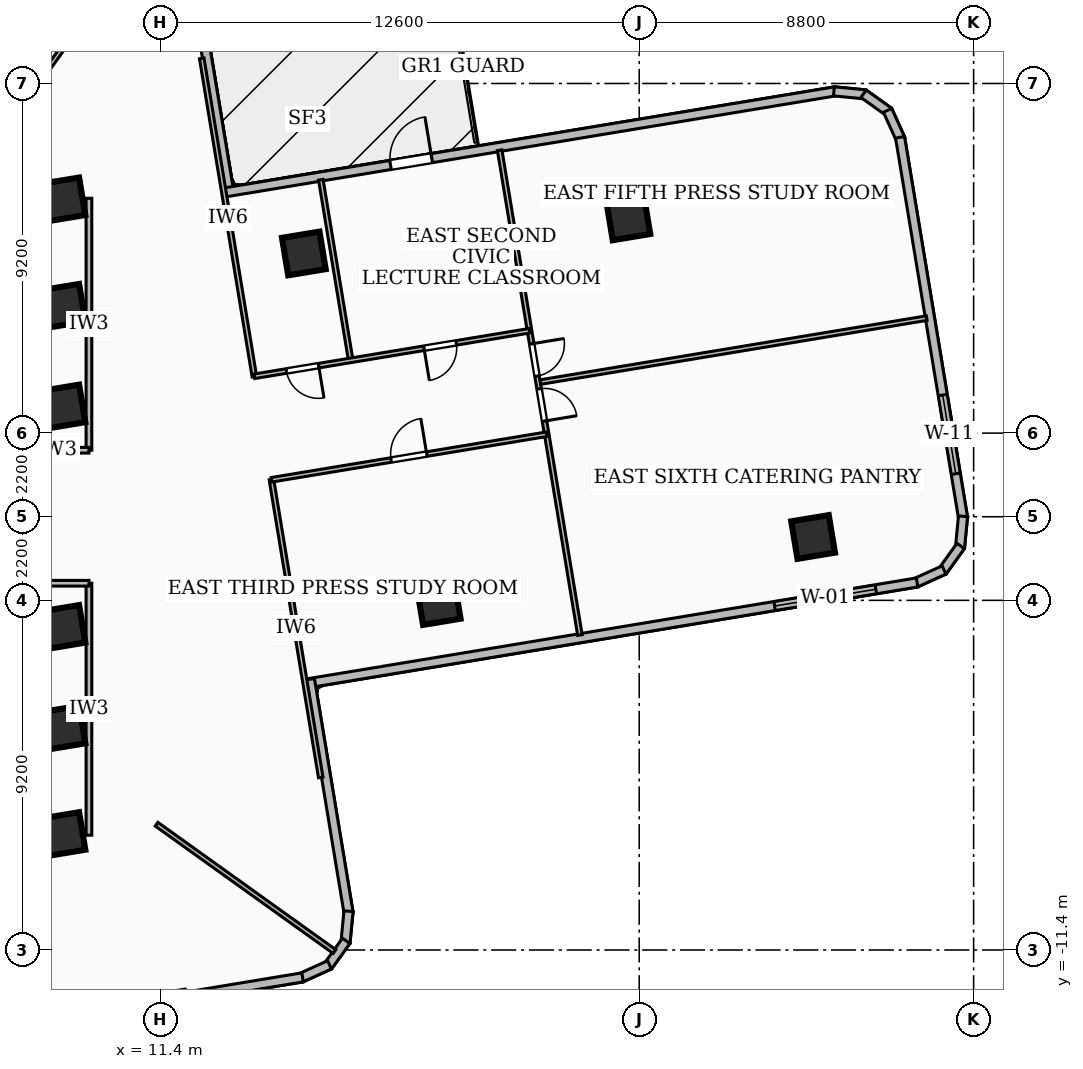
"""IFC4 building model, lengths in metres.
Left out: names, types, materials, properties, quantities, classifications, styles, units other than length and angle.
Written with IfcOpenShell. Run it as: python <this file> out.ifc"""

import sys

from ifc_helpers import new_model, si_unit, direction, frame, frame_2d, origin, origin_2d, place, context, subcontext, project, spatial, rectangle, extrude, element, fill, save


model = new_model("IFC4")
c1 = context("Model", 3, precision=1e-05, world=origin(), true_north=direction((0.0, 1.0)))
c2 = subcontext(c1, "Body", "Model", "MODEL_VIEW")
j1 = project(units=[si_unit("LENGTHUNIT", "METRE"), si_unit("PLANEANGLEUNIT", "RADIAN")], contexts=[c1])
p1 = place(None, origin())
s1 = spatial("IfcSite", under=j1, at=p1, CompositionType="ELEMENT")
p2 = place(p1, origin())
s2 = spatial("IfcBuilding", under=s1, at=p2, CompositionType="ELEMENT")
p3 = place(p2, frame((0.0, 0.0, 96.48)))
s3 = spatial("IfcBuildingStorey", under=s2, at=p3, CompositionType="ELEMENT", Elevation=96.48)
for number, where, z_axis, x_axis in (
    (1, (-8.78, 8.56, 0.0), (0.0, 0.0, 1.0), (1.0, 0.0, 0.0)),
    (2, (8.78, -8.56, 0.0), (0.0, 0.0, 1.0), (-1.0, 0.0, 0.0)),
):
    element("IfcWall", number, at=place(p3, frame(where, z_axis=z_axis, x_axis=x_axis)), inside=s3, PredefinedType="SHEAR", context=c2, shape_type="SweptSolid", body=[
        extrude(rectangle(XDim=17.56, YDim=0.5, at=frame_2d((8.78, 0.0))), origin(), (0.0, 0.0, 1.0), 3.34),
    ])
for number, where, z_axis, x_axis in (
    (3, (8.85, -5.55, 0.0), (0.0, 0.0, 1.0), (0.987, 0.163, 0.0)),
    (4, (8.85, -2.9, 0.0), (0.0, 0.0, 1.0), (0.987, 0.163, 0.0)),
    (5, (8.85, 2.9, 0.0), (0.0, 0.0, 1.0), (0.987, 0.163, 0.0)),
    (6, (8.85, 5.55, 0.0), (0.0, 0.0, 1.0), (0.987, 0.163, 0.0)),
    (7, (8.85, -8.35, 0.0), (0.0, 0.0, 1.0), (0.987, 0.163, 0.0)),
    (8, (8.85, 8.35, 0.0), (0.0, 0.0, 1.0), (0.987, 0.163, 0.0)),
    (9, (18.724, -2.271, 0.0), (0.0, 0.0, 1.0), (0.987, 0.163, 0.0)),
    (10, (15.175, 6.927, 0.0), (0.0, 0.0, 1.0), (0.987, 0.163, 0.0)),
    (11, (28.576, -0.533, 0.0), (0.0, 0.0, 1.0), (0.987, 0.163, 0.0)),
    (12, (23.715, 7.851, 0.0), (0.0, 0.0, 1.0), (0.987, 0.163, 0.0)),
):
    element("IfcColumn", number, at=place(p3, frame(where, z_axis=z_axis, x_axis=x_axis)), inside=s3, PredefinedType="COLUMN", context=c2, shape_type="SweptSolid", body=[
        extrude(rectangle(XDim=1.0, YDim=1.0, at=origin_2d()), origin(), (0.0, 0.0, 1.0), 3.6),
    ])
p4 = place(p3, frame((12.12, 15.142, 0.0), z_axis=(0.0, 0.0, 1.0), x_axis=(0.163241835244, -0.986586085056, 0.0)))
e13 = element("IfcWall", 13, at=p4, inside=s3, PredefinedType="SOLIDWALL", context=c2, shape_type="SweptSolid", body=[
    extrude(rectangle(XDim=6.775, YDim=0.24, at=frame_2d((3.387, 0.0))), origin(), (0.0, 0.0, 1.0), 3.34),
])
p5 = place(p3, frame((13.115, 8.537, 0.0), z_axis=(0.0, 0.0, 1.0), x_axis=(0.986576548161, 0.163299463007, 0.0)))
e14 = element("IfcWall", 14, at=p5, inside=s3, PredefinedType="SOLIDWALL", context=c2, shape_type="SweptSolid", body=[
    extrude(rectangle(XDim=16.277, YDim=0.24, at=frame_2d((8.138, 0.0))), origin(), (0.0, 0.0, 1.0), 3.34),
])
p6 = place(p5, frame((4.4, 0.0, 0.0)))
e15 = element("IfcOpeningElement", 15, at=p6, cuts=e14, PredefinedType="OPENING", context=c2, shape_type="SweptSolid", body=[
    extrude(rectangle(XDim=1.1, YDim=2.1, at=frame_2d((0.55, 1.05))), frame((0.0, 0.13, 0.0), z_axis=(0.0, -1.0, 0.0), x_axis=(1.0, 0.0, 0.0)), (0.0, 0.0, 1.0), 0.26),
])
p7 = place(p3, frame((29.123, 11.193, 0.0), z_axis=(0.0, 0.0, 1.0), x_axis=(0.995332708541, -0.096502846113, 0.0)))
e16 = element("IfcWall", 16, at=p7, inside=s3, PredefinedType="SOLIDWALL", context=c2, shape_type="SweptSolid", body=[
    extrude(rectangle(XDim=0.83, YDim=0.24, at=frame_2d((0.415, 0.0))), origin(), (0.0, 0.0, 1.0), 3.34),
])
p8 = place(p3, frame((29.904, 11.13, 0.0), z_axis=(0.0, 0.0, 1.0), x_axis=(0.812516648433, -0.582937986427, 0.0)))
e17 = element("IfcWall", 17, at=p8, inside=s3, PredefinedType="SOLIDWALL", context=c2, shape_type="SweptSolid", body=[
    extrude(rectangle(XDim=0.815, YDim=0.24, at=frame_2d((0.407, 0.0))), origin(), (0.0, 0.0, 1.0), 3.34),
])
p9 = place(p3, frame((30.536, 10.693, 0.0), z_axis=(0.0, 0.0, 1.0), x_axis=(0.411720575173, -0.911310138196, 0.0)))
e18 = element("IfcWall", 18, at=p9, inside=s3, PredefinedType="SOLIDWALL", context=c2, shape_type="SweptSolid", body=[
    extrude(rectangle(XDim=0.831, YDim=0.24, at=frame_2d((0.416, 0.0))), origin(), (0.0, 0.0, 1.0), 3.34),
])
p10 = place(p3, frame((30.864, 9.984, 0.0), z_axis=(0.0, 0.0, 1.0), x_axis=(0.163307635867, -0.986575195344, 0.0)))
e19 = element("IfcWall", 19, at=p10, inside=s3, PredefinedType="SOLIDWALL", context=c2, shape_type="SweptSolid", body=[
    extrude(rectangle(XDim=10.158, YDim=0.24, at=frame_2d((5.079, 0.0))), origin(), (0.0, 0.0, 1.0), 3.34),
])
p11 = place(p10, frame((6.874, 0.0, 0.85)))
e20 = element("IfcOpeningElement", 20, at=p11, cuts=e19, PredefinedType="OPENING", context=c2, shape_type="SweptSolid", body=[
    extrude(rectangle(XDim=2.1, YDim=1.6, at=frame_2d((1.05, 0.8))), frame((0.0, 0.13, 0.0), z_axis=(0.0, -1.0, 0.0), x_axis=(1.0, 0.0, 0.0)), (0.0, 0.0, 1.0), 0.26),
])
p12 = place(p3, frame((32.521, 0.012, 0.0), z_axis=(0.0, 0.0, 1.0), x_axis=(-0.096389937095, -0.995343649212, 0.0)))
e21 = element("IfcWall", 21, at=p12, inside=s3, PredefinedType="SOLIDWALL", context=c2, shape_type="SweptSolid", body=[
    extrude(rectangle(XDim=0.831, YDim=0.24, at=frame_2d((0.416, 0.0))), origin(), (0.0, 0.0, 1.0), 3.34),
])
p13 = place(p3, frame((32.458, -0.77, 0.0), z_axis=(0.0, 0.0, 1.0), x_axis=(-0.583704032354, -0.811966503382, 0.0)))
e22 = element("IfcWall", 22, at=p13, inside=s3, PredefinedType="SOLIDWALL", context=c2, shape_type="SweptSolid", body=[
    extrude(rectangle(XDim=0.814, YDim=0.24, at=frame_2d((0.407, 0.0))), origin(), (0.0, 0.0, 1.0), 3.34),
])
p14 = place(p3, frame((32.021, -1.401, 0.0), z_axis=(0.0, 0.0, 1.0), x_axis=(-0.911310138196, -0.411720575173, 0.0)))
e23 = element("IfcWall", 23, at=p14, inside=s3, PredefinedType="SOLIDWALL", context=c2, shape_type="SweptSolid", body=[
    extrude(rectangle(XDim=0.831, YDim=0.24, at=frame_2d((0.416, 0.0))), origin(), (0.0, 0.0, 1.0), 3.34),
])
p15 = place(p3, frame((31.312, -1.729, 0.0), z_axis=(0.0, 0.0, 1.0), x_axis=(-0.986572947557, -0.163321214629, 0.0)))
e24 = element("IfcWall", 24, at=p15, inside=s3, PredefinedType="SOLIDWALL", context=c2, shape_type="SweptSolid", body=[
    extrude(rectangle(XDim=16.274, YDim=0.24, at=frame_2d((8.137, 0.0))), origin(), (0.0, 0.0, 1.0), 3.34),
])
p16 = place(p15, frame((1.1, 0.0, 0.85)))
e25 = element("IfcOpeningElement", 25, at=p16, cuts=e24, PredefinedType="OPENING", context=c2, shape_type="SweptSolid", body=[
    extrude(rectangle(XDim=2.7, YDim=2.1, at=frame_2d((1.35, 1.05))), frame((0.0, 0.13, 0.0), z_axis=(0.0, -1.0, 0.0), x_axis=(1.0, 0.0, 0.0)), (0.0, 0.0, 1.0), 0.26),
])
p17 = place(p3, frame((15.335, -4.276, 0.0), z_axis=(0.0, 0.0, 1.0), x_axis=(0.16323720082, -0.986586851863, 0.0)))
e26 = element("IfcWall", 26, at=p17, inside=s3, PredefinedType="SOLIDWALL", context=c2, shape_type="SweptSolid", body=[
    extrude(rectangle(XDim=6.237, YDim=0.24, at=frame_2d((3.118, 0.0))), origin(), (0.0, 0.0, 1.0), 3.34),
])
p18 = place(p3, frame((16.351, -10.379, 0.0), z_axis=(0.0, 0.0, 1.0), x_axis=(-0.096474594184, -0.995335447313, 0.0)))
e27 = element("IfcWall", 27, at=p18, inside=s3, PredefinedType="SOLIDWALL", context=c2, shape_type="SweptSolid", body=[
    extrude(rectangle(XDim=0.83, YDim=0.24, at=frame_2d((0.415, 0.0))), origin(), (0.0, 0.0, 1.0), 3.34),
])
p19 = place(p3, frame((16.288, -11.16, 0.0), z_axis=(0.0, 0.0, 1.0), x_axis=(-0.583561896965, -0.812068662375, 0.0)))
e28 = element("IfcWall", 28, at=p19, inside=s3, PredefinedType="SOLIDWALL", context=c2, shape_type="SweptSolid", body=[
    extrude(rectangle(XDim=0.814, YDim=0.24, at=frame_2d((0.407, 0.0))), origin(), (0.0, 0.0, 1.0), 3.34),
])
p20 = place(p3, frame((15.851, -11.791, 0.0), z_axis=(0.0, 0.0, 1.0), x_axis=(-0.910868773958, -0.412696106872, 0.0)))
e29 = element("IfcWall", 29, at=p20, inside=s3, PredefinedType="SOLIDWALL", context=c2, shape_type="SweptSolid", body=[
    extrude(rectangle(XDim=0.831, YDim=0.24, at=frame_2d((0.416, 0.0))), origin(), (0.0, 0.0, 1.0), 3.34),
])
p21 = place(p3, frame((15.142, -12.12, 0.0), z_axis=(0.0, 0.0, 1.0), x_axis=(-0.986586085056, -0.163241835244, 0.0)))
e30 = element("IfcWall", 30, at=p21, inside=s3, PredefinedType="SOLIDWALL", context=c2, shape_type="SweptSolid", body=[
    extrude(rectangle(XDim=6.775, YDim=0.24, at=frame_2d((3.387, 0.0))), origin(), (0.0, 0.0, 1.0), 3.34),
])
p22 = place(p3, frame((9.52, 1.75, 0.0), z_axis=(0.0, 0.0, 1.0), x_axis=(0.0, 1.0, 0.0)))
e31 = element("IfcWall", 31, at=p22, inside=s3, PredefinedType="PARTITIONING", context=c2, shape_type="SweptSolid", body=[
    extrude(rectangle(XDim=6.63, YDim=0.15, at=frame_2d((3.315, 0.0))), origin(), (0.0, 0.0, 1.0), 2.486),
])
p23 = place(p3, frame((7.85, 1.75, 0.0), z_axis=(0.0, 0.0, 1.0), x_axis=(1.0, 0.0, 0.0)))
e32 = element("IfcWall", 32, at=p23, inside=s3, PredefinedType="PARTITIONING", context=c2, shape_type="SweptSolid", body=[
    extrude(rectangle(XDim=1.67, YDim=0.15, at=frame_2d((0.835, 0.0))), origin(), (0.0, 0.0, 1.0), 2.405),
])
p24 = place(p3, frame((9.52, -8.38, 0.0), z_axis=(0.0, 0.0, 1.0), x_axis=(0.0, 1.0, 0.0)))
e33 = element("IfcWall", 33, at=p24, inside=s3, PredefinedType="PARTITIONING", context=c2, shape_type="SweptSolid", body=[
    extrude(rectangle(XDim=6.63, YDim=0.15, at=frame_2d((3.315, 0.0))), origin(), (0.0, 0.0, 1.0), 2.486),
])
p25 = place(p3, frame((7.85, -1.75, 0.0), z_axis=(0.0, 0.0, 1.0), x_axis=(1.0, 0.0, 0.0)))
e34 = element("IfcWall", 34, at=p25, inside=s3, PredefinedType="PARTITIONING", context=c2, shape_type="SweptSolid", body=[
    extrude(rectangle(XDim=1.67, YDim=0.15, at=frame_2d((0.835, 0.0))), origin(), (0.0, 0.0, 1.0), 2.405),
])
p26 = place(p3, frame((7.431, 10.38, 0.0), z_axis=(0.0, 0.0, 1.0), x_axis=(0.582126278944, 0.813098392178, 0.0)))
e35 = element("IfcWall", 35, at=p26, inside=s3, PredefinedType="PARTITIONING", context=c2, shape_type="SweptSolid", body=[
    extrude(rectangle(XDim=6.889, YDim=0.12, at=frame_2d((3.444, 0.0))), origin(), (0.0, 0.0, 1.0), 2.486),
])
p27 = place(p3, frame((11.3, -8.09, 0.0), z_axis=(0.0, 0.0, 1.0), x_axis=(0.813131268368, -0.582080355623, 0.0)))
e36 = element("IfcWall", 36, at=p27, inside=s3, PredefinedType="PARTITIONING", context=c2, shape_type="SweptSolid", body=[
    extrude(rectangle(XDim=5.757, YDim=0.12, at=frame_2d((2.878, 0.0))), origin(), (0.0, 0.0, 1.0), 3.34),
])
p28 = place(p3, frame((13.874, 3.686, 0.0), z_axis=(0.0, 0.0, 1.0), x_axis=(-0.163270245909, 0.98658138377, 0.0)))
e37 = element("IfcWall", 37, at=p28, inside=s3, PredefinedType="PARTITIONING", context=c2, shape_type="SweptSolid", body=[
    extrude(rectangle(XDim=8.489, YDim=0.12, at=frame_2d((4.245, 0.0))), origin(), (0.0, 0.0, 1.0), 2.486),
])
p29 = place(p3, frame((15.62, -6.86, 0.0), z_axis=(0.0, 0.0, 1.0), x_axis=(-0.16330811288, 0.986575116384, 0.0)))
e38 = element("IfcWall", 38, at=p29, inside=s3, PredefinedType="PARTITIONING", context=c2, shape_type="SweptSolid", body=[
    extrude(rectangle(XDim=7.949, YDim=0.12, at=frame_2d((3.974, 0.0))), origin(), (0.0, 0.0, 1.0), 2.486),
])
p30 = place(p3, frame((16.405, 4.135, 0.0), z_axis=(0.0, 0.0, 1.0), x_axis=(-0.163276056047, 0.986580422227, 0.0)))
e39 = element("IfcWall", 39, at=p30, inside=s3, PredefinedType="PARTITIONING", context=c2, shape_type="SweptSolid", body=[
    extrude(rectangle(XDim=4.795, YDim=0.12, at=frame_2d((2.398, 0.0))), origin(), (0.0, 0.0, 1.0), 2.486),
])
p31 = place(p3, frame((21.114, 4.894, 0.0), z_axis=(0.0, 0.0, 1.0), x_axis=(-0.986566884893, -0.163357833093, 0.0)))
e40 = element("IfcWall", 40, at=p31, inside=s3, PredefinedType="PARTITIONING", context=c2, shape_type="SweptSolid", body=[
    extrude(rectangle(XDim=7.34, YDim=0.12, at=frame_2d((3.67, 0.0))), origin(), (0.0, 0.0, 1.0), 3.34),
])
p32 = place(p31, frame((5.625, 0.0, 0.0)))
e41 = element("IfcOpeningElement", 41, at=p32, cuts=e40, PredefinedType="OPENING", context=c2, shape_type="SweptSolid", body=[
    extrude(rectangle(XDim=0.86, YDim=2.04, at=frame_2d((0.43, 1.02))), frame((0.0, 0.07, 0.0), z_axis=(0.0, -1.0, 0.0), x_axis=(1.0, 0.0, 0.0)), (0.0, 0.0, 1.0), 0.14),
])
p33 = place(p31, frame((1.955, 0.0, 0.0)))
e42 = element("IfcOpeningElement", 42, at=p33, cuts=e40, PredefinedType="OPENING", context=c2, shape_type="SweptSolid", body=[
    extrude(rectangle(XDim=0.86, YDim=2.04, at=frame_2d((0.43, 1.02))), frame((0.0, 0.07, 0.0), z_axis=(0.0, -1.0, 0.0), x_axis=(1.0, 0.0, 0.0)), (0.0, 0.0, 1.0), 0.14),
])
p34 = place(p3, frame((14.324, 0.972, 0.0), z_axis=(0.0, 0.0, 1.0), x_axis=(0.986566884893, 0.163357833093, 0.0)))
e43 = element("IfcWall", 43, at=p34, inside=s3, PredefinedType="PARTITIONING", context=c2, shape_type="SweptSolid", body=[
    extrude(rectangle(XDim=7.34, YDim=0.12, at=frame_2d((3.67, 0.0))), origin(), (0.0, 0.0, 1.0), 3.34),
])
p35 = place(p34, frame((3.19, 0.0, 0.0)))
e44 = element("IfcOpeningElement", 44, at=p35, cuts=e43, PredefinedType="OPENING", context=c2, shape_type="SweptSolid", body=[
    extrude(rectangle(XDim=0.95, YDim=2.08, at=frame_2d((0.475, 1.04))), frame((0.0, 0.07, 0.0), z_axis=(0.0, -1.0, 0.0), x_axis=(1.0, 0.0, 0.0)), (0.0, 0.0, 1.0), 0.14),
])
p36 = place(p3, frame((21.399, 3.543, 0.0), z_axis=(0.0, 0.0, 1.0), x_axis=(0.986570089658, 0.16333847738, 0.0)))
e45 = element("IfcWall", 45, at=p36, inside=s3, PredefinedType="PARTITIONING", context=c2, shape_type="SweptSolid", body=[
    extrude(rectangle(XDim=10.304, YDim=0.12, at=frame_2d((5.152, 0.0))), origin(), (0.0, 0.0, 1.0), 2.832),
])
p37 = place(p3, frame((20.328, 9.645, 0.0), z_axis=(0.0, 0.0, 1.0), x_axis=(0.163336472865, -0.986570421527, 0.0)))
e46 = element("IfcWall", 46, at=p37, inside=s3, PredefinedType="PARTITIONING", context=c2, shape_type="SweptSolid", body=[
    extrude(rectangle(XDim=12.931, YDim=0.12, at=frame_2d((6.465, 0.0))), origin(), (0.0, 0.0, 1.0), 2.486),
])
p38 = place(p37, frame((6.365, 0.0, 0.0)))
e47 = element("IfcOpeningElement", 47, at=p38, cuts=e46, PredefinedType="OPENING", context=c2, shape_type="SweptSolid", body=[
    extrude(rectangle(XDim=0.86, YDim=2.04, at=frame_2d((0.43, 1.02))), frame((0.0, 0.07, 0.0), z_axis=(0.0, -1.0, 0.0), x_axis=(1.0, 0.0, 0.0)), (0.0, 0.0, 1.0), 0.14),
])
p39 = place(p37, frame((5.165, 0.0, 0.0)))
e48 = element("IfcOpeningElement", 48, at=p39, cuts=e46, PredefinedType="OPENING", context=c2, shape_type="SweptSolid", body=[
    extrude(rectangle(XDim=0.86, YDim=2.04, at=frame_2d((0.43, 1.02))), frame((0.0, 0.07, 0.0), z_axis=(0.0, -1.0, 0.0), x_axis=(1.0, 0.0, 0.0)), (0.0, 0.0, 1.0), 0.14),
])
p40 = place(p6, origin())
e49 = element("IfcDoor", 49, at=p40, inside=s3, OperationType="SINGLE_SWING_RIGHT", PredefinedType="DOOR", context=c2, shape_type="SweptSolid", body=[
    extrude(rectangle(XDim=1.1, YDim=2.1, at=frame_2d((0.55, 1.05))), frame((0.0, 0.025, 0.0), z_axis=(0.0, -1.0, 0.0), x_axis=(1.0, 0.0, 0.0)), (0.0, 0.0, 1.0), 0.05),
])
fill(e15, e49)
p41 = place(p11, origin())
e50 = element("IfcWindow", 50, at=p41, inside=s3, PartitioningType="SINGLE_PANEL", PredefinedType="WINDOW", context=c2, shape_type="SweptSolid", body=[
    extrude(rectangle(XDim=2.1, YDim=1.6, at=frame_2d((1.05, 0.8))), frame((0.0, 0.03, 0.0), z_axis=(0.0, -1.0, 0.0), x_axis=(1.0, 0.0, 0.0)), (0.0, 0.0, 1.0), 0.06),
])
fill(e20, e50)
p42 = place(p16, origin())
e51 = element("IfcWindow", 51, at=p42, inside=s3, PartitioningType="SINGLE_PANEL", PredefinedType="WINDOW", context=c2, shape_type="SweptSolid", body=[
    extrude(rectangle(XDim=2.7, YDim=2.1, at=frame_2d((1.35, 1.05))), frame((0.0, 0.03, 0.0), z_axis=(0.0, -1.0, 0.0), x_axis=(1.0, 0.0, 0.0)), (0.0, 0.0, 1.0), 0.06),
])
fill(e25, e51)
p43 = place(p32, origin())
e52 = element("IfcDoor", 52, at=p43, inside=s3, OperationType="SINGLE_SWING_LEFT", PredefinedType="DOOR", context=c2, shape_type="SweptSolid", body=[
    extrude(rectangle(XDim=0.86, YDim=2.04, at=frame_2d((0.43, 1.02))), frame((0.0, 0.025, 0.0), z_axis=(0.0, -1.0, 0.0), x_axis=(1.0, 0.0, 0.0)), (0.0, 0.0, 1.0), 0.05),
])
fill(e41, e52)
p44 = place(p33, origin())
e53 = element("IfcDoor", 53, at=p44, inside=s3, OperationType="SINGLE_SWING_RIGHT", PredefinedType="DOOR", context=c2, shape_type="SweptSolid", body=[
    extrude(rectangle(XDim=0.86, YDim=2.04, at=frame_2d((0.43, 1.02))), frame((0.0, 0.025, 0.0), z_axis=(0.0, -1.0, 0.0), x_axis=(1.0, 0.0, 0.0)), (0.0, 0.0, 1.0), 0.05),
])
fill(e42, e53)
p45 = place(p35, origin())
e54 = element("IfcDoor", 54, at=p45, inside=s3, OperationType="SINGLE_SWING_RIGHT", PredefinedType="DOOR", context=c2, shape_type="SweptSolid", body=[
    extrude(rectangle(XDim=0.95, YDim=2.08, at=frame_2d((0.475, 1.04))), frame((0.0, 0.025, 0.0), z_axis=(0.0, -1.0, 0.0), x_axis=(1.0, 0.0, 0.0)), (0.0, 0.0, 1.0), 0.05),
])
fill(e44, e54)
p46 = place(p38, origin())
e55 = element("IfcDoor", 55, at=p46, inside=s3, OperationType="SINGLE_SWING_RIGHT", PredefinedType="DOOR", context=c2, shape_type="SweptSolid", body=[
    extrude(rectangle(XDim=0.86, YDim=2.04, at=frame_2d((0.43, 1.02))), frame((0.0, 0.025, 0.0), z_axis=(0.0, -1.0, 0.0), x_axis=(1.0, 0.0, 0.0)), (0.0, 0.0, 1.0), 0.05),
])
fill(e47, e55)
p47 = place(p39, origin())
e56 = element("IfcDoor", 56, at=p47, inside=s3, OperationType="SINGLE_SWING_LEFT", PredefinedType="DOOR", context=c2, shape_type="SweptSolid", body=[
    extrude(rectangle(XDim=0.86, YDim=2.04, at=frame_2d((0.43, 1.02))), frame((0.0, 0.025, 0.0), z_axis=(0.0, -1.0, 0.0), x_axis=(1.0, 0.0, 0.0)), (0.0, 0.0, 1.0), 0.05),
])
fill(e48, e56)
save(model, sys.argv[1])
